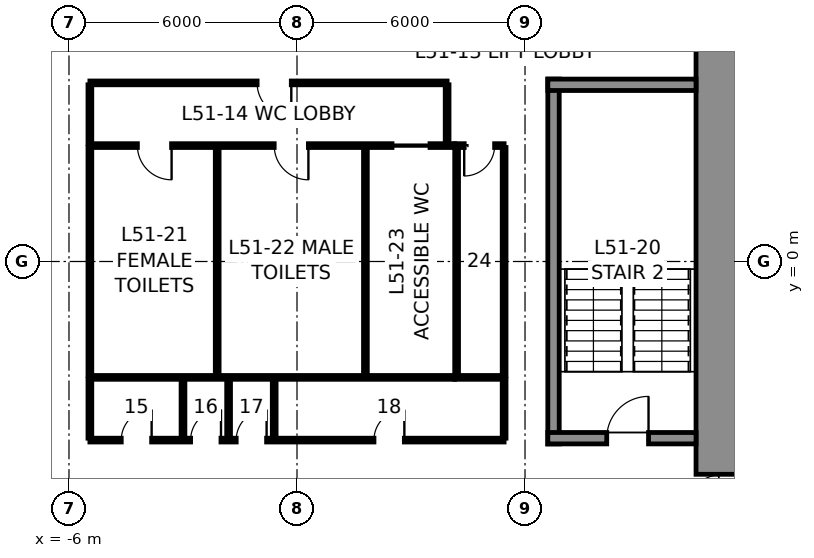
"""IFC4 building model, lengths in metres.
Left out: names, types, materials, properties, quantities, classifications, styles, units other than length and angle.
Written with IfcOpenShell. Run it as: python <this file> out.ifc"""

import sys

from ifc_helpers import new_model, si_unit, direction, frame, frame_2d, origin, place, context, subcontext, project, spatial, rectangle, extrude, element, fill, save


model = new_model("IFC4")
c1 = context("Model", 3, precision=1e-05, world=origin(), true_north=direction((0.0, 1.0)))
c2 = subcontext(c1, "Body", "Model", "MODEL_VIEW")
j1 = project(units=[si_unit("LENGTHUNIT", "METRE"), si_unit("PLANEANGLEUNIT", "RADIAN")], contexts=[c1])
p1 = place(None, origin())
s1 = spatial("IfcSite", under=j1, at=p1, CompositionType="ELEMENT")
p2 = place(p1, origin())
s2 = spatial("IfcBuilding", under=s1, at=p2, CompositionType="ELEMENT")
p3 = place(p2, frame((0.0, 0.0, 233.8)))
s3 = spatial("IfcBuildingStorey", under=s2, at=p3, CompositionType="ELEMENT", Elevation=233.8)
p4 = place(p3, frame((11.25, 10.5, 0.0), z_axis=(0.0, 0.0, 1.0), x_axis=(0.0, -1.0, 0.0)))
e1 = element("IfcWall", 1, at=p4, inside=s3, PredefinedType="SHEAR", context=c2, shape_type="SweptSolid", body=[
    extrude(rectangle(XDim=21.0, YDim=1.5, at=frame_2d((10.5, 0.0))), origin(), (0.0, 0.0, 1.0), 4.0),
])
p5 = place(p4, frame((3.7, 0.0, 0.0)))
e2 = element("IfcOpeningElement", 2, at=p5, cuts=e1, PredefinedType="OPENING", context=c2, shape_type="SweptSolid", body=[
    extrude(rectangle(XDim=1.2, YDim=2.3, at=frame_2d((0.6, 1.15))), frame((0.0, 0.76, 0.0), z_axis=(0.0, -1.0, 0.0), x_axis=(1.0, 0.0, 0.0)), (0.0, 0.0, 1.0), 1.52),
])
p6 = place(p4, frame((16.1, 0.0, 0.0)))
e3 = element("IfcOpeningElement", 3, at=p6, cuts=e1, PredefinedType="OPENING", context=c2, shape_type="SweptSolid", body=[
    extrude(rectangle(XDim=1.2, YDim=2.3, at=frame_2d((0.6, 1.15))), frame((0.0, 0.76, 0.0), z_axis=(0.0, -1.0, 0.0), x_axis=(1.0, 0.0, 0.0)), (0.0, 0.0, 1.0), 1.52),
])
p7 = place(p3, frame((6.75, -4.8, 0.0), z_axis=(0.0, 0.0, 1.0), x_axis=(0.0, 1.0, 0.0)))
e4 = element("IfcWall", 4, at=p7, inside=s3, PredefinedType="SOLIDWALL", context=c2, shape_type="SweptSolid", body=[
    extrude(rectangle(XDim=9.6, YDim=0.3, at=frame_2d((4.8, 0.0))), origin(), (0.0, 0.0, 1.0), 3.75),
])
p8 = place(p3, frame((6.6, 4.65, 0.0), z_axis=(0.0, 0.0, 1.0), x_axis=(1.0, 0.0, 0.0)))
e5 = element("IfcWall", 5, at=p8, inside=s3, PredefinedType="SOLIDWALL", context=c2, shape_type="SweptSolid", body=[
    extrude(rectangle(XDim=3.9, YDim=0.3, at=frame_2d((1.95, 0.0))), origin(), (0.0, 0.0, 1.0), 3.75),
])
p9 = place(p3, frame((10.5, -4.65, 0.0), z_axis=(0.0, 0.0, 1.0), x_axis=(-1.0, 0.0, 0.0)))
e6 = element("IfcWall", 6, at=p9, inside=s3, PredefinedType="SOLIDWALL", context=c2, shape_type="SweptSolid", body=[
    extrude(rectangle(XDim=3.9, YDim=0.3, at=frame_2d((1.95, 0.0))), origin(), (0.0, 0.0, 1.0), 3.75),
])
p10 = place(p9, frame((1.25, 0.0, 0.0)))
e7 = element("IfcOpeningElement", 7, at=p10, cuts=e6, PredefinedType="OPENING", context=c2, shape_type="SweptSolid", body=[
    extrude(rectangle(XDim=1.1, YDim=2.3, at=frame_2d((0.55, 1.15))), frame((0.0, 0.16, 0.0), z_axis=(0.0, -1.0, 0.0), x_axis=(1.0, 0.0, 0.0)), (0.0, 0.0, 1.0), 0.32),
])
p11 = place(p3, frame((-5.45, 3.05, 0.0), z_axis=(0.0, 0.0, 1.0), x_axis=(1.0, 0.0, 0.0)))
e8 = element("IfcWall", 8, at=p11, inside=s3, PredefinedType="PARTITIONING", context=c2, shape_type="SweptSolid", body=[
    extrude(rectangle(XDim=9.6, YDim=0.1, at=frame_2d((4.8, 0.0))), origin(), (0.0, 0.0, 1.0), 3.75),
])
p12 = place(p11, frame((1.25, 0.0, 0.0)))
e9 = element("IfcOpeningElement", 9, at=p12, cuts=e8, PredefinedType="OPENING", context=c2, shape_type="SweptSolid", body=[
    extrude(rectangle(XDim=0.9, YDim=2.3, at=frame_2d((0.45, 1.15))), frame((0.0, 0.06, 0.0), z_axis=(0.0, -1.0, 0.0), x_axis=(1.0, 0.0, 0.0)), (0.0, 0.0, 1.0), 0.12),
])
p13 = place(p11, frame((4.85, 0.0, 0.0)))
e10 = element("IfcOpeningElement", 10, at=p13, cuts=e8, PredefinedType="OPENING", context=c2, shape_type="SweptSolid", body=[
    extrude(rectangle(XDim=0.9, YDim=2.3, at=frame_2d((0.45, 1.15))), frame((0.0, 0.06, 0.0), z_axis=(0.0, -1.0, 0.0), x_axis=(1.0, 0.0, 0.0)), (0.0, 0.0, 1.0), 0.12),
])
p14 = place(p11, frame((7.95, 0.0, 0.0)))
e11 = element("IfcOpeningElement", 11, at=p14, cuts=e8, PredefinedType="OPENING", context=c2, shape_type="SweptSolid", body=[
    extrude(rectangle(XDim=1.0, YDim=2.3, at=frame_2d((0.5, 1.15))), frame((0.0, 0.06, 0.0), z_axis=(0.0, -1.0, 0.0), x_axis=(1.0, 0.0, 0.0)), (0.0, 0.0, 1.0), 0.12),
])
p15 = place(p3, frame((4.15, 3.05, 0.0), z_axis=(0.0, 0.0, 1.0), x_axis=(1.0, 0.0, 0.0)))
e12 = element("IfcWall", 12, at=p15, inside=s3, PredefinedType="PARTITIONING", context=c2, shape_type="SweptSolid", body=[
    extrude(rectangle(XDim=1.3, YDim=0.1, at=frame_2d((0.65, 0.0))), origin(), (0.0, 0.0, 1.0), 3.75),
])
p16 = place(p15, frame((0.25, 0.0, 0.0)))
e13 = element("IfcOpeningElement", 13, at=p16, cuts=e12, PredefinedType="OPENING", context=c2, shape_type="SweptSolid", body=[
    extrude(rectangle(XDim=0.8, YDim=2.3, at=frame_2d((0.4, 1.15))), frame((0.0, 0.06, 0.0), z_axis=(0.0, -1.0, 0.0), x_axis=(1.0, 0.0, 0.0)), (0.0, 0.0, 1.0), 0.12),
])
p17 = place(p3, frame((4.15, -3.05, 0.0), z_axis=(0.0, 0.0, 1.0), x_axis=(-1.0, 0.0, 0.0)))
e14 = element("IfcWall", 14, at=p17, inside=s3, PredefinedType="PARTITIONING", context=c2, shape_type="SweptSolid", body=[
    extrude(rectangle(XDim=9.6, YDim=0.1, at=frame_2d((4.8, 0.0))), origin(), (0.0, 0.0, 1.0), 3.75),
])
p18 = place(p3, frame((5.45, -3.05, 0.0), z_axis=(0.0, 0.0, 1.0), x_axis=(-1.0, 0.0, 0.0)))
e15 = element("IfcWall", 15, at=p18, inside=s3, PredefinedType="PARTITIONING", context=c2, shape_type="SweptSolid", body=[
    extrude(rectangle(XDim=1.3, YDim=0.1, at=frame_2d((0.65, 0.0))), origin(), (0.0, 0.0, 1.0), 3.75),
])
for number, where, z_axis, x_axis in (
    (16, (5.45, 3.0, 0.0), (0.0, 0.0, 1.0), (0.0, -1.0, 0.0)),
    (17, (-5.45, -3.0, 0.0), (0.0, 0.0, 1.0), (0.0, 1.0, 0.0)),
    (18, (-2.1, -3.0, 0.0), (0.0, 0.0, 1.0), (0.0, 1.0, 0.0)),
    (19, (1.8, -3.0, 0.0), (0.0, 0.0, 1.0), (0.0, 1.0, 0.0)),
    (20, (4.2, -3.0, 0.0), (0.0, 0.0, 1.0), (0.0, 1.0, 0.0)),
):
    element("IfcWall", number, at=place(p3, frame(where, z_axis=z_axis, x_axis=x_axis)), inside=s3, PredefinedType="PARTITIONING", context=c2, shape_type="SweptSolid", body=[
        extrude(rectangle(XDim=6.0, YDim=0.1, at=frame_2d((3.0, 0.0))), origin(), (0.0, 0.0, 1.0), 3.75),
    ])
p19 = place(p3, frame((-5.45, 4.7, 0.0), z_axis=(0.0, 0.0, 1.0), x_axis=(1.0, 0.0, 0.0)))
e21 = element("IfcWall", 21, at=p19, inside=s3, PredefinedType="PARTITIONING", context=c2, shape_type="SweptSolid", body=[
    extrude(rectangle(XDim=9.4, YDim=0.1, at=frame_2d((4.7, 0.0))), origin(), (0.0, 0.0, 1.0), 3.75),
])
p20 = place(p19, frame((4.4, 0.0, 0.0)))
e22 = element("IfcOpeningElement", 22, at=p20, cuts=e21, PredefinedType="OPENING", context=c2, shape_type="SweptSolid", body=[
    extrude(rectangle(XDim=0.9, YDim=2.3, at=frame_2d((0.45, 1.15))), frame((0.0, 0.06, 0.0), z_axis=(0.0, -1.0, 0.0), x_axis=(1.0, 0.0, 0.0)), (0.0, 0.0, 1.0), 0.12),
])
for number, where, z_axis, x_axis in (
    (23, (-5.45, 3.1, 0.0), (0.0, 0.0, 1.0), (0.0, 1.0, 0.0)),
    (24, (3.95, 3.1, 0.0), (0.0, 0.0, 1.0), (0.0, 1.0, 0.0)),
):
    element("IfcWall", number, at=place(p3, frame(where, z_axis=z_axis, x_axis=x_axis)), inside=s3, PredefinedType="PARTITIONING", context=c2, shape_type="SweptSolid", body=[
        extrude(rectangle(XDim=1.55, YDim=0.1, at=frame_2d((0.775, 0.0))), origin(), (0.0, 0.0, 1.0), 3.75),
    ])
p21 = place(p3, frame((5.45, -4.7, 0.0), z_axis=(0.0, 0.0, 1.0), x_axis=(-1.0, 0.0, 0.0)))
e25 = element("IfcWall", 25, at=p21, inside=s3, PredefinedType="PARTITIONING", context=c2, shape_type="SweptSolid", body=[
    extrude(rectangle(XDim=10.9, YDim=0.1, at=frame_2d((5.45, 0.0))), origin(), (0.0, 0.0, 1.0), 3.75),
])
p22 = place(p21, frame((9.275, 0.0, 0.0)))
e26 = element("IfcOpeningElement", 26, at=p22, cuts=e25, PredefinedType="OPENING", context=c2, shape_type="SweptSolid", body=[
    extrude(rectangle(XDim=0.8, YDim=2.3, at=frame_2d((0.4, 1.15))), frame((0.0, 0.06, 0.0), z_axis=(0.0, -1.0, 0.0), x_axis=(1.0, 0.0, 0.0)), (0.0, 0.0, 1.0), 0.12),
])
p23 = place(p21, frame((7.45, 0.0, 0.0)))
e27 = element("IfcOpeningElement", 27, at=p23, cuts=e25, PredefinedType="OPENING", context=c2, shape_type="SweptSolid", body=[
    extrude(rectangle(XDim=0.8, YDim=2.3, at=frame_2d((0.4, 1.15))), frame((0.0, 0.06, 0.0), z_axis=(0.0, -1.0, 0.0), x_axis=(1.0, 0.0, 0.0)), (0.0, 0.0, 1.0), 0.12),
])
p24 = place(p21, frame((6.25, 0.0, 0.0)))
e28 = element("IfcOpeningElement", 28, at=p24, cuts=e25, PredefinedType="OPENING", context=c2, shape_type="SweptSolid", body=[
    extrude(rectangle(XDim=0.8, YDim=2.3, at=frame_2d((0.4, 1.15))), frame((0.0, 0.06, 0.0), z_axis=(0.0, -1.0, 0.0), x_axis=(1.0, 0.0, 0.0)), (0.0, 0.0, 1.0), 0.12),
])
p25 = place(p21, frame((2.625, 0.0, 0.0)))
e29 = element("IfcOpeningElement", 29, at=p25, cuts=e25, PredefinedType="OPENING", context=c2, shape_type="SweptSolid", body=[
    extrude(rectangle(XDim=0.8, YDim=2.3, at=frame_2d((0.4, 1.15))), frame((0.0, 0.06, 0.0), z_axis=(0.0, -1.0, 0.0), x_axis=(1.0, 0.0, 0.0)), (0.0, 0.0, 1.0), 0.12),
])
for number, where, z_axis, x_axis in (
    (30, (-5.45, -3.1, 0.0), (0.0, 0.0, 1.0), (0.0, -1.0, 0.0)),
    (31, (5.45, -3.1, 0.0), (0.0, 0.0, 1.0), (0.0, -1.0, 0.0)),
    (32, (-3.0, -3.1, 0.0), (0.0, 0.0, 1.0), (0.0, -1.0, 0.0)),
    (33, (-1.8, -3.1, 0.0), (0.0, 0.0, 1.0), (0.0, -1.0, 0.0)),
    (34, (-0.6, -3.1, 0.0), (0.0, 0.0, 1.0), (0.0, -1.0, 0.0)),
):
    element("IfcWall", number, at=place(p3, frame(where, z_axis=z_axis, x_axis=x_axis)), inside=s3, PredefinedType="PARTITIONING", context=c2, shape_type="SweptSolid", body=[
        extrude(rectangle(XDim=1.55, YDim=0.1, at=frame_2d((0.775, 0.0))), origin(), (0.0, 0.0, 1.0), 3.75),
    ])
p26 = place(p10, frame((1.1, 0.0, 0.0), z_axis=(0.0, 0.0, 1.0), x_axis=(-1.0, 0.0, 0.0)))
e35 = element("IfcDoor", 35, at=p26, inside=s3, OperationType="SINGLE_SWING_RIGHT", PredefinedType="DOOR", context=c2, shape_type="SweptSolid", body=[
    extrude(rectangle(XDim=1.1, YDim=2.3, at=frame_2d((0.55, 1.15))), frame((0.0, 0.025, 0.0), z_axis=(0.0, -1.0, 0.0), x_axis=(1.0, 0.0, 0.0)), (0.0, 0.0, 1.0), 0.05),
])
fill(e7, e35)
p27 = place(p12, frame((0.9, 0.0, 0.0), z_axis=(0.0, 0.0, 1.0), x_axis=(-1.0, 0.0, 0.0)))
e36 = element("IfcDoor", 36, at=p27, inside=s3, OperationType="SINGLE_SWING_LEFT", PredefinedType="DOOR", context=c2, shape_type="SweptSolid", body=[
    extrude(rectangle(XDim=0.9, YDim=2.3, at=frame_2d((0.45, 1.15))), frame((0.0, 0.025, 0.0), z_axis=(0.0, -1.0, 0.0), x_axis=(1.0, 0.0, 0.0)), (0.0, 0.0, 1.0), 0.05),
])
fill(e9, e36)
p28 = place(p13, frame((0.9, 0.0, 0.0), z_axis=(0.0, 0.0, 1.0), x_axis=(-1.0, 0.0, 0.0)))
e37 = element("IfcDoor", 37, at=p28, inside=s3, OperationType="SINGLE_SWING_LEFT", PredefinedType="DOOR", context=c2, shape_type="SweptSolid", body=[
    extrude(rectangle(XDim=0.9, YDim=2.3, at=frame_2d((0.45, 1.15))), frame((0.0, 0.025, 0.0), z_axis=(0.0, -1.0, 0.0), x_axis=(1.0, 0.0, 0.0)), (0.0, 0.0, 1.0), 0.05),
])
fill(e10, e37)
p29 = place(p14, frame((1.0, 0.0, 0.0), z_axis=(0.0, 0.0, 1.0), x_axis=(-1.0, 0.0, 0.0)))
e38 = element("IfcDoor", 38, at=p29, inside=s3, OperationType="SLIDING_TO_LEFT", PredefinedType="DOOR", context=c2, shape_type="SweptSolid", body=[
    extrude(rectangle(XDim=1.0, YDim=2.3, at=frame_2d((0.5, 1.15))), frame((0.0, 0.025, 0.0), z_axis=(0.0, -1.0, 0.0), x_axis=(1.0, 0.0, 0.0)), (0.0, 0.0, 1.0), 0.05),
])
fill(e11, e38)
p30 = place(p16, frame((0.8, 0.0, 0.0), z_axis=(0.0, 0.0, 1.0), x_axis=(-1.0, 0.0, 0.0)))
e39 = element("IfcDoor", 39, at=p30, inside=s3, OperationType="SINGLE_SWING_RIGHT", PredefinedType="DOOR", context=c2, shape_type="SweptSolid", body=[
    extrude(rectangle(XDim=0.8, YDim=2.3, at=frame_2d((0.4, 1.15))), frame((0.0, 0.025, 0.0), z_axis=(0.0, -1.0, 0.0), x_axis=(1.0, 0.0, 0.0)), (0.0, 0.0, 1.0), 0.05),
])
fill(e13, e39)
p31 = place(p20, frame((0.9, 0.0, 0.0), z_axis=(0.0, 0.0, 1.0), x_axis=(-1.0, 0.0, 0.0)))
e40 = element("IfcDoor", 40, at=p31, inside=s3, OperationType="SINGLE_SWING_LEFT", PredefinedType="DOOR", context=c2, shape_type="SweptSolid", body=[
    extrude(rectangle(XDim=0.9, YDim=2.3, at=frame_2d((0.45, 1.15))), frame((0.0, 0.025, 0.0), z_axis=(0.0, -1.0, 0.0), x_axis=(1.0, 0.0, 0.0)), (0.0, 0.0, 1.0), 0.05),
])
fill(e22, e40)
p32 = place(p22, frame((0.8, 0.0, 0.0), z_axis=(0.0, 0.0, 1.0), x_axis=(-1.0, 0.0, 0.0)))
e41 = element("IfcDoor", 41, at=p32, inside=s3, OperationType="SINGLE_SWING_RIGHT", PredefinedType="DOOR", context=c2, shape_type="SweptSolid", body=[
    extrude(rectangle(XDim=0.8, YDim=2.3, at=frame_2d((0.4, 1.15))), frame((0.0, 0.025, 0.0), z_axis=(0.0, -1.0, 0.0), x_axis=(1.0, 0.0, 0.0)), (0.0, 0.0, 1.0), 0.05),
])
fill(e26, e41)
p33 = place(p23, frame((0.8, 0.0, 0.0), z_axis=(0.0, 0.0, 1.0), x_axis=(-1.0, 0.0, 0.0)))
e42 = element("IfcDoor", 42, at=p33, inside=s3, OperationType="SINGLE_SWING_RIGHT", PredefinedType="DOOR", context=c2, shape_type="SweptSolid", body=[
    extrude(rectangle(XDim=0.8, YDim=2.3, at=frame_2d((0.4, 1.15))), frame((0.0, 0.025, 0.0), z_axis=(0.0, -1.0, 0.0), x_axis=(1.0, 0.0, 0.0)), (0.0, 0.0, 1.0), 0.05),
])
fill(e27, e42)
p34 = place(p24, frame((0.8, 0.0, 0.0), z_axis=(0.0, 0.0, 1.0), x_axis=(-1.0, 0.0, 0.0)))
e43 = element("IfcDoor", 43, at=p34, inside=s3, OperationType="SINGLE_SWING_RIGHT", PredefinedType="DOOR", context=c2, shape_type="SweptSolid", body=[
    extrude(rectangle(XDim=0.8, YDim=2.3, at=frame_2d((0.4, 1.15))), frame((0.0, 0.025, 0.0), z_axis=(0.0, -1.0, 0.0), x_axis=(1.0, 0.0, 0.0)), (0.0, 0.0, 1.0), 0.05),
])
fill(e28, e43)
p35 = place(p25, frame((0.8, 0.0, 0.0), z_axis=(0.0, 0.0, 1.0), x_axis=(-1.0, 0.0, 0.0)))
e44 = element("IfcDoor", 44, at=p35, inside=s3, OperationType="SINGLE_SWING_RIGHT", PredefinedType="DOOR", context=c2, shape_type="SweptSolid", body=[
    extrude(rectangle(XDim=0.8, YDim=2.3, at=frame_2d((0.4, 1.15))), frame((0.0, 0.025, 0.0), z_axis=(0.0, -1.0, 0.0), x_axis=(1.0, 0.0, 0.0)), (0.0, 0.0, 1.0), 0.05),
])
fill(e29, e44)
p36 = place(p6, frame((1.2, 0.0, 0.0), z_axis=(0.0, 0.0, 1.0), x_axis=(-1.0, 0.0, 0.0)))
e45 = element("IfcDoor", 45, at=p36, inside=s3, OperationType="SINGLE_SWING_LEFT", PredefinedType="DOOR", context=c2, shape_type="SweptSolid", body=[
    extrude(rectangle(XDim=1.2, YDim=2.3, at=frame_2d((0.6, 1.15))), frame((0.0, 0.025, 0.0), z_axis=(0.0, -1.0, 0.0), x_axis=(1.0, 0.0, 0.0)), (0.0, 0.0, 1.0), 0.05),
])
fill(e3, e45)
save(model, sys.argv[1])
